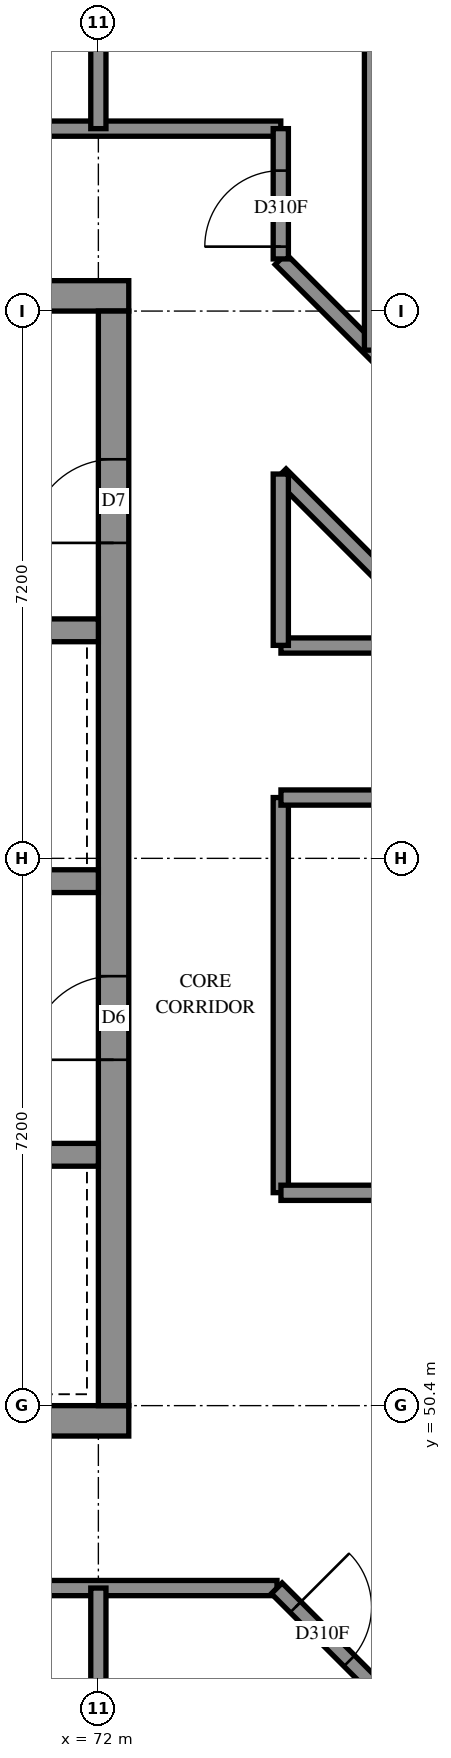
"""IFC4 building model, lengths in metres.
Left out: names, types, materials, properties, quantities, classifications, styles, units other than length and angle.
Written with IfcOpenShell. Run it as: python <this file> out.ifc"""

import sys

from ifc_helpers import new_model, si_unit, direction, frame, frame_2d, origin, place, context, subcontext, project, spatial, rectangle, extrude, element, fill, save


model = new_model("IFC4")
c1 = context("Model", 3, precision=1e-05, world=origin(), true_north=direction((0.0, 1.0)))
c2 = subcontext(c1, "Body", "Model", "MODEL_VIEW")
j1 = project(units=[si_unit("LENGTHUNIT", "METRE"), si_unit("PLANEANGLEUNIT", "RADIAN")], contexts=[c1])
p1 = place(None, origin())
s1 = spatial("IfcSite", under=j1, at=p1, CompositionType="ELEMENT")
p2 = place(p1, origin())
s2 = spatial("IfcBuilding", under=s1, at=p2, CompositionType="ELEMENT")
p3 = place(p2, frame((0.0, 0.0, 254.0)))
s3 = spatial("IfcBuildingStorey", under=s2, at=p3, CompositionType="ELEMENT", Elevation=254.0)
p4 = place(p3, frame((57.2, 50.2, -0.3), z_axis=(0.0, 0.0, 1.0), x_axis=(1.0, 0.0, 0.0)))
e1 = element("IfcWall", 1, at=p4, inside=s3, PredefinedType="SHEAR", context=c2, shape_type="SweptSolid", body=[
    extrude(rectangle(XDim=15.2, YDim=0.4, at=frame_2d((7.6, 0.0))), origin(), (0.0, 0.0, 1.0), 2.7),
])
p5 = place(p3, frame((57.2, 65.0, -0.3), z_axis=(0.0, 0.0, 1.0), x_axis=(1.0, 0.0, 0.0)))
e2 = element("IfcWall", 2, at=p5, inside=s3, PredefinedType="SHEAR", context=c2, shape_type="SweptSolid", body=[
    extrude(rectangle(XDim=15.2, YDim=0.4, at=frame_2d((7.6, 0.0))), origin(), (0.0, 0.0, 1.0), 2.7),
])
p6 = place(p5, frame((10.4, 0.0, 0.3)))
e3 = element("IfcOpeningElement", 3, at=p6, cuts=e2, PredefinedType="OPENING", context=c2, shape_type="SweptSolid", body=[
    extrude(rectangle(XDim=0.8, YDim=2.1, at=frame_2d((0.4, 1.05))), frame((0.0, 0.21, 0.0), z_axis=(0.0, -1.0, 0.0), x_axis=(1.0, 0.0, 0.0)), (0.0, 0.0, 1.0), 0.42),
])
p7 = place(p3, frame((72.2, 50.4, -0.3), z_axis=(0.0, 0.0, 1.0), x_axis=(0.0, 1.0, 0.0)))
e4 = element("IfcWall", 4, at=p7, inside=s3, PredefinedType="SHEAR", context=c2, shape_type="SweptSolid", body=[
    extrude(rectangle(XDim=14.4, YDim=0.4, at=frame_2d((7.2, 0.0))), origin(), (0.0, 0.0, 1.0), 2.7),
])
p8 = place(p7, frame((4.55, 0.0, 0.3)))
e5 = element("IfcOpeningElement", 5, at=p8, cuts=e4, PredefinedType="OPENING", context=c2, shape_type="SweptSolid", body=[
    extrude(rectangle(XDim=1.1, YDim=2.1, at=frame_2d((0.55, 1.05))), frame((0.0, 0.21, 0.0), z_axis=(0.0, -1.0, 0.0), x_axis=(1.0, 0.0, 0.0)), (0.0, 0.0, 1.0), 0.42),
])
p9 = place(p7, frame((11.35, 0.0, 0.3)))
e6 = element("IfcOpeningElement", 6, at=p9, cuts=e4, PredefinedType="OPENING", context=c2, shape_type="SweptSolid", body=[
    extrude(rectangle(XDim=1.1, YDim=2.1, at=frame_2d((0.55, 1.05))), frame((0.0, 0.21, 0.0), z_axis=(0.0, -1.0, 0.0), x_axis=(1.0, 0.0, 0.0)), (0.0, 0.0, 1.0), 0.42),
])
p10 = place(p3, frame((57.6, 53.7, 0.0), z_axis=(0.0, 0.0, 1.0), x_axis=(1.0, 0.0, 0.0)))
e7 = element("IfcWall", 7, at=p10, inside=s3, PredefinedType="SOLIDWALL", context=c2, shape_type="SweptSolid", body=[
    extrude(rectangle(XDim=14.4, YDim=0.3, at=frame_2d((7.2, 0.0))), origin(), (0.0, 0.0, 1.0), 3.1),
])
p11 = place(p10, frame((1.35, 0.0, 0.0)))
e8 = element("IfcOpeningElement", 8, at=p11, cuts=e7, PredefinedType="OPENING", context=c2, shape_type="SweptSolid", body=[
    extrude(rectangle(XDim=0.9, YDim=2.1, at=frame_2d((0.45, 1.05))), frame((0.0, 0.16, 0.0), z_axis=(0.0, -1.0, 0.0), x_axis=(1.0, 0.0, 0.0)), (0.0, 0.0, 1.0), 0.32),
])
p12 = place(p10, frame((4.95, 0.0, 0.0)))
e9 = element("IfcOpeningElement", 9, at=p12, cuts=e7, PredefinedType="OPENING", context=c2, shape_type="SweptSolid", body=[
    extrude(rectangle(XDim=0.9, YDim=2.1, at=frame_2d((0.45, 1.05))), frame((0.0, 0.16, 0.0), z_axis=(0.0, -1.0, 0.0), x_axis=(1.0, 0.0, 0.0)), (0.0, 0.0, 1.0), 0.32),
])
p13 = place(p10, frame((8.55, 0.0, 0.0)))
e10 = element("IfcOpeningElement", 10, at=p13, cuts=e7, PredefinedType="OPENING", context=c2, shape_type="SweptSolid", body=[
    extrude(rectangle(XDim=0.9, YDim=2.1, at=frame_2d((0.45, 1.05))), frame((0.0, 0.16, 0.0), z_axis=(0.0, -1.0, 0.0), x_axis=(1.0, 0.0, 0.0)), (0.0, 0.0, 1.0), 0.32),
])
p14 = place(p10, frame((12.05, 0.0, 0.0)))
e11 = element("IfcOpeningElement", 11, at=p14, cuts=e7, PredefinedType="OPENING", context=c2, shape_type="SweptSolid", body=[
    extrude(rectangle(XDim=1.1, YDim=2.1, at=frame_2d((0.55, 1.05))), frame((0.0, 0.16, 0.0), z_axis=(0.0, -1.0, 0.0), x_axis=(1.0, 0.0, 0.0)), (0.0, 0.0, 1.0), 0.32),
])
p15 = place(p3, frame((57.6, 57.3, 0.0), z_axis=(0.0, 0.0, 1.0), x_axis=(1.0, 0.0, 0.0)))
e12 = element("IfcWall", 12, at=p15, inside=s3, PredefinedType="SOLIDWALL", context=c2, shape_type="SweptSolid", body=[
    extrude(rectangle(XDim=14.4, YDim=0.3, at=frame_2d((7.2, 0.0))), origin(), (0.0, 0.0, 1.0), 3.1),
])
p16 = place(p15, frame((8.55, 0.0, 0.0)))
e13 = element("IfcOpeningElement", 13, at=p16, cuts=e12, PredefinedType="OPENING", context=c2, shape_type="SweptSolid", body=[
    extrude(rectangle(XDim=0.9, YDim=2.1, at=frame_2d((0.45, 1.05))), frame((0.0, 0.16, 0.0), z_axis=(0.0, -1.0, 0.0), x_axis=(1.0, 0.0, 0.0)), (0.0, 0.0, 1.0), 0.32),
])
p17 = place(p15, frame((1.25, 0.0, 0.0)))
e14 = element("IfcOpeningElement", 14, at=p17, cuts=e12, PredefinedType="OPENING", context=c2, shape_type="SweptSolid", body=[
    extrude(rectangle(XDim=1.1, YDim=2.1, at=frame_2d((0.55, 1.05))), frame((0.0, 0.16, 0.0), z_axis=(0.0, -1.0, 0.0), x_axis=(1.0, 0.0, 0.0)), (0.0, 0.0, 1.0), 0.32),
])
p18 = place(p15, frame((4.85, 0.0, 0.0)))
e15 = element("IfcOpeningElement", 15, at=p18, cuts=e12, PredefinedType="OPENING", context=c2, shape_type="SweptSolid", body=[
    extrude(rectangle(XDim=1.1, YDim=2.1, at=frame_2d((0.55, 1.05))), frame((0.0, 0.16, 0.0), z_axis=(0.0, -1.0, 0.0), x_axis=(1.0, 0.0, 0.0)), (0.0, 0.0, 1.0), 0.32),
])
p19 = place(p15, frame((12.05, 0.0, 0.0)))
e16 = element("IfcOpeningElement", 16, at=p19, cuts=e12, PredefinedType="OPENING", context=c2, shape_type="SweptSolid", body=[
    extrude(rectangle(XDim=1.1, YDim=2.1, at=frame_2d((0.55, 1.05))), frame((0.0, 0.16, 0.0), z_axis=(0.0, -1.0, 0.0), x_axis=(1.0, 0.0, 0.0)), (0.0, 0.0, 1.0), 0.32),
])
p20 = place(p3, frame((64.8, 60.6, 0.0), z_axis=(0.0, 0.0, 1.0), x_axis=(1.0, 0.0, 0.0)))
e17 = element("IfcWall", 17, at=p20, inside=s3, PredefinedType="SOLIDWALL", context=c2, shape_type="SweptSolid", body=[
    extrude(rectangle(XDim=7.2, YDim=0.3, at=frame_2d((3.6, 0.0))), origin(), (0.0, 0.0, 1.0), 3.1),
])
p21 = place(p3, frame((55.2, 67.2, 0.0), z_axis=(0.0, 0.0, 1.0), x_axis=(1.0, 0.0, 0.0)))
e18 = element("IfcWall", 18, at=p21, inside=s3, PredefinedType="PARTITIONING", context=c2, shape_type="SweptSolid", body=[
    extrude(rectangle(XDim=19.2, YDim=0.2, at=frame_2d((9.6, 0.0))), origin(), (0.0, 0.0, 1.0), 3.1),
])
p22 = place(p21, frame((4.475, 0.0, 0.0)))
e19 = element("IfcOpeningElement", 19, at=p22, cuts=e18, PredefinedType="OPENING", context=c2, shape_type="SweptSolid", body=[
    extrude(rectangle(XDim=1.0, YDim=2.1, at=frame_2d((0.5, 1.05))), frame((0.0, 0.11, 0.0), z_axis=(0.0, -1.0, 0.0), x_axis=(1.0, 0.0, 0.0)), (0.0, 0.0, 1.0), 0.22),
])
p23 = place(p21, frame((8.301, 0.0, 0.0)))
e20 = element("IfcOpeningElement", 20, at=p23, cuts=e18, PredefinedType="OPENING", context=c2, shape_type="SweptSolid", body=[
    extrude(rectangle(XDim=0.9, YDim=2.1, at=frame_2d((0.45, 1.05))), frame((0.0, 0.11, 0.0), z_axis=(0.0, -1.0, 0.0), x_axis=(1.0, 0.0, 0.0)), (0.0, 0.0, 1.0), 0.22),
])
p24 = place(p21, frame((13.88, 0.0, 0.0)))
e21 = element("IfcOpeningElement", 21, at=p24, cuts=e18, PredefinedType="OPENING", context=c2, shape_type="SweptSolid", body=[
    extrude(rectangle(XDim=1.0, YDim=2.1, at=frame_2d((0.5, 1.05))), frame((0.0, 0.11, 0.0), z_axis=(0.0, -1.0, 0.0), x_axis=(1.0, 0.0, 0.0)), (0.0, 0.0, 1.0), 0.22),
])
p25 = place(p3, frame((55.2, 48.0, 0.0), z_axis=(0.0, 0.0, 1.0), x_axis=(1.0, 0.0, 0.0)))
e22 = element("IfcWall", 22, at=p25, inside=s3, PredefinedType="PARTITIONING", context=c2, shape_type="SweptSolid", body=[
    extrude(rectangle(XDim=19.15, YDim=0.2, at=frame_2d((9.575, 0.0))), origin(), (0.0, 0.0, 1.0), 3.1),
])
p26 = place(p25, frame((6.343, 0.0, 0.0)))
e23 = element("IfcOpeningElement", 23, at=p26, cuts=e22, PredefinedType="OPENING", context=c2, shape_type="SweptSolid", body=[
    extrude(rectangle(XDim=0.9, YDim=2.1, at=frame_2d((0.45, 1.05))), frame((0.0, 0.11, 0.0), z_axis=(0.0, -1.0, 0.0), x_axis=(1.0, 0.0, 0.0)), (0.0, 0.0, 1.0), 0.22),
])
p27 = place(p25, frame((11.633, 0.0, 0.0)))
e24 = element("IfcOpeningElement", 24, at=p27, cuts=e22, PredefinedType="OPENING", context=c2, shape_type="SweptSolid", body=[
    extrude(rectangle(XDim=1.0, YDim=2.1, at=frame_2d((0.5, 1.05))), frame((0.0, 0.11, 0.0), z_axis=(0.0, -1.0, 0.0), x_axis=(1.0, 0.0, 0.0)), (0.0, 0.0, 1.0), 0.22),
])
p28 = place(p25, frame((13.707, 0.0, 0.0)))
e25 = element("IfcOpeningElement", 25, at=p28, cuts=e22, PredefinedType="OPENING", context=c2, shape_type="SweptSolid", body=[
    extrude(rectangle(XDim=1.0, YDim=2.1, at=frame_2d((0.5, 1.05))), frame((0.0, 0.11, 0.0), z_axis=(0.0, -1.0, 0.0), x_axis=(1.0, 0.0, 0.0)), (0.0, 0.0, 1.0), 0.22),
])
p29 = place(p3, frame((74.397, 65.483, 0.0), z_axis=(0.0, 0.0, 1.0), x_axis=(0.7071067812, -0.7071067812, 0.0)))
e26 = element("IfcWall", 26, at=p29, inside=s3, PredefinedType="PARTITIONING", context=c2, shape_type="SweptSolid", body=[
    extrude(rectangle(XDim=10.788, YDim=0.2, at=frame_2d((5.394, 0.0))), origin(), (0.0, 0.0, 1.0), 3.1),
])
p30 = place(p29, frame((5.083, 0.0, 0.0)))
e27 = element("IfcOpeningElement", 27, at=p30, cuts=e26, PredefinedType="OPENING", context=c2, shape_type="SweptSolid", body=[
    extrude(rectangle(XDim=1.0, YDim=2.1, at=frame_2d((0.5, 1.05))), frame((0.0, 0.11, 0.0), z_axis=(0.0, -1.0, 0.0), x_axis=(1.0, 0.0, 0.0)), (0.0, 0.0, 1.0), 0.22),
])
p31 = place(p29, frame((7.858, 0.0, 0.0)))
e28 = element("IfcOpeningElement", 28, at=p31, cuts=e26, PredefinedType="OPENING", context=c2, shape_type="SweptSolid", body=[
    extrude(rectangle(XDim=1.0, YDim=2.1, at=frame_2d((0.5, 1.05))), frame((0.0, 0.11, 0.0), z_axis=(0.0, -1.0, 0.0), x_axis=(1.0, 0.0, 0.0)), (0.0, 0.0, 1.0), 0.22),
])
p32 = place(p3, frame((75.6, 64.286, 0.0), z_axis=(0.0, 0.0, 1.0), x_axis=(0.0, 1.0, 0.0)))
e29 = element("IfcWall", 29, at=p32, inside=s3, PredefinedType="PARTITIONING", context=c2, shape_type="SweptSolid", body=[
    extrude(rectangle(XDim=8.532, YDim=0.2, at=frame_2d((4.266, 0.0))), origin(), (0.0, 0.0, 1.0), 3.1),
])
p33 = place(p3, frame((74.4, 53.202, 0.0), z_axis=(0.0, 0.0, 1.0), x_axis=(0.0, 1.0, 0.0)))
e30 = element("IfcWall", 30, at=p33, inside=s3, PredefinedType="PARTITIONING", context=c2, shape_type="SweptSolid", body=[
    extrude(rectangle(XDim=5.198, YDim=0.2, at=frame_2d((2.599, 0.0))), origin(), (0.0, 0.0, 1.0), 3.1),
])
p34 = place(p3, frame((74.347, 47.997, 0.0), z_axis=(0.0, 0.0, 1.0), x_axis=(0.7071067812, -0.7071067812, 0.0)))
e31 = element("IfcWall", 31, at=p34, inside=s3, PredefinedType="PARTITIONING", context=c2, shape_type="SweptSolid", body=[
    extrude(rectangle(XDim=4.596, YDim=0.2, at=frame_2d((2.298, 0.0))), origin(), (0.0, 0.0, 1.0), 3.1),
])
p35 = place(p34, frame((0.35, 0.0, 0.0)))
e32 = element("IfcOpeningElement", 32, at=p35, cuts=e31, PredefinedType="OPENING", context=c2, shape_type="SweptSolid", body=[
    extrude(rectangle(XDim=1.0, YDim=2.1, at=frame_2d((0.5, 1.05))), frame((0.0, 0.11, 0.0), z_axis=(0.0, -1.0, 0.0), x_axis=(1.0, 0.0, 0.0)), (0.0, 0.0, 1.0), 0.22),
])
p36 = place(p3, frame((72.0, 43.55, 0.0), z_axis=(0.0, 0.0, 1.0), x_axis=(0.0, 1.0, 0.0)))
e33 = element("IfcWall", 33, at=p36, inside=s3, PredefinedType="PARTITIONING", context=c2, shape_type="SweptSolid", body=[
    extrude(rectangle(XDim=4.45, YDim=0.2, at=frame_2d((2.225, 0.0))), origin(), (0.0, 0.0, 1.0), 3.1),
])
p37 = place(p3, frame((72.0, 67.2, 0.0), z_axis=(0.0, 0.0, 1.0), x_axis=(0.0, 1.0, 0.0)))
e34 = element("IfcWall", 34, at=p37, inside=s3, PredefinedType="PARTITIONING", context=c2, shape_type="SweptSolid", body=[
    extrude(rectangle(XDim=4.346, YDim=0.2, at=frame_2d((2.173, 0.0))), origin(), (0.0, 0.0, 1.0), 3.1),
])
p38 = place(p3, frame((74.402, 58.4, 0.0), z_axis=(0.0, 0.0, 1.0), x_axis=(1.0, 0.0, 0.0)))
e35 = element("IfcWall", 35, at=p38, inside=s3, PredefinedType="PARTITIONING", context=c2, shape_type="SweptSolid", body=[
    extrude(rectangle(XDim=4.256, YDim=0.2, at=frame_2d((2.128, 0.0))), origin(), (0.0, 0.0, 1.0), 3.1),
])
p39 = place(p38, frame((1.331, 0.0, 0.0)))
e36 = element("IfcOpeningElement", 36, at=p39, cuts=e35, PredefinedType="OPENING", context=c2, shape_type="SweptSolid", body=[
    extrude(rectangle(XDim=1.0, YDim=2.1, at=frame_2d((0.5, 1.05))), frame((0.0, 0.11, 0.0), z_axis=(0.0, -1.0, 0.0), x_axis=(1.0, 0.0, 0.0)), (0.0, 0.0, 1.0), 0.22),
])
p40 = place(p3, frame((74.399, 62.653, 0.0), z_axis=(0.0, 0.0, 1.0), x_axis=(0.7071067812, -0.7071067812, 0.0)))
e37 = element("IfcWall", 37, at=p40, inside=s3, PredefinedType="PARTITIONING", context=c2, shape_type="SweptSolid", body=[
    extrude(rectangle(XDim=3.188, YDim=0.2, at=frame_2d((1.594, 0.0))), origin(), (0.0, 0.0, 1.0), 3.1),
])
p41 = place(p3, frame((74.402, 53.2, 0.0), z_axis=(0.0, 0.0, 1.0), x_axis=(1.0, 0.0, 0.0)))
e38 = element("IfcWall", 38, at=p41, inside=s3, PredefinedType="PARTITIONING", context=c2, shape_type="SweptSolid", body=[
    extrude(rectangle(XDim=2.968, YDim=0.2, at=frame_2d((1.484, 0.0))), origin(), (0.0, 0.0, 1.0), 3.1),
])
for number, where, z_axis, x_axis in (
    (39, (74.402, 60.4, 0.0), (0.0, 0.0, 1.0), (1.0, 0.0, 0.0)),
    (40, (74.4, 60.402, 0.0), (0.0, 0.0, 1.0), (0.0, 1.0, 0.0)),
):
    element("IfcWall", number, at=place(p3, frame(where, z_axis=z_axis, x_axis=x_axis)), inside=s3, PredefinedType="PARTITIONING", context=c2, shape_type="SweptSolid", body=[
        extrude(rectangle(XDim=2.254, YDim=0.2, at=frame_2d((1.127, 0.0))), origin(), (0.0, 0.0, 1.0), 3.1),
    ])
p42 = place(p3, frame((74.4, 65.486, 0.0), z_axis=(0.0, 0.0, 1.0), x_axis=(0.0, 1.0, 0.0)))
e41 = element("IfcWall", 41, at=p42, inside=s3, PredefinedType="PARTITIONING", context=c2, shape_type="SweptSolid", body=[
    extrude(rectangle(XDim=1.714, YDim=0.2, at=frame_2d((0.857, 0.0))), origin(), (0.0, 0.0, 1.0), 3.1),
])
p43 = place(p42, frame((0.162, 0.0, 0.0)))
e42 = element("IfcOpeningElement", 42, at=p43, cuts=e41, PredefinedType="OPENING", context=c2, shape_type="SweptSolid", body=[
    extrude(rectangle(XDim=1.0, YDim=2.1, at=frame_2d((0.5, 1.05))), frame((0.0, 0.11, 0.0), z_axis=(0.0, -1.0, 0.0), x_axis=(1.0, 0.0, 0.0)), (0.0, 0.0, 1.0), 0.22),
])
p44 = place(p8, origin())
e43 = element("IfcDoor", 43, at=p44, inside=s3, OperationType="DOUBLE_DOOR_SINGLE_SWING", PredefinedType="DOOR", context=c2, shape_type="SweptSolid", body=[
    extrude(rectangle(XDim=1.1, YDim=2.1, at=frame_2d((0.55, 1.05))), frame((0.0, 0.025, 0.0), z_axis=(0.0, -1.0, 0.0), x_axis=(1.0, 0.0, 0.0)), (0.0, 0.0, 1.0), 0.05),
])
fill(e5, e43)
p45 = place(p9, origin())
e44 = element("IfcDoor", 44, at=p45, inside=s3, OperationType="SINGLE_SWING_RIGHT", PredefinedType="DOOR", context=c2, shape_type="SweptSolid", body=[
    extrude(rectangle(XDim=1.1, YDim=2.1, at=frame_2d((0.55, 1.05))), frame((0.0, 0.025, 0.0), z_axis=(0.0, -1.0, 0.0), x_axis=(1.0, 0.0, 0.0)), (0.0, 0.0, 1.0), 0.05),
])
fill(e6, e44)
p46 = place(p35, origin())
e45 = element("IfcDoor", 45, at=p46, inside=s3, OperationType="SINGLE_SWING_LEFT", PredefinedType="DOOR", context=c2, shape_type="SweptSolid", body=[
    extrude(rectangle(XDim=1.0, YDim=2.1, at=frame_2d((0.5, 1.05))), frame((0.0, 0.025, 0.0), z_axis=(0.0, -1.0, 0.0), x_axis=(1.0, 0.0, 0.0)), (0.0, 0.0, 1.0), 0.05),
])
fill(e32, e45)
p47 = place(p43, origin())
e46 = element("IfcDoor", 46, at=p47, inside=s3, OperationType="SINGLE_SWING_RIGHT", PredefinedType="DOOR", context=c2, shape_type="SweptSolid", body=[
    extrude(rectangle(XDim=1.0, YDim=2.1, at=frame_2d((0.5, 1.05))), frame((0.0, 0.025, 0.0), z_axis=(0.0, -1.0, 0.0), x_axis=(1.0, 0.0, 0.0)), (0.0, 0.0, 1.0), 0.05),
])
fill(e42, e46)
save(model, sys.argv[1])
